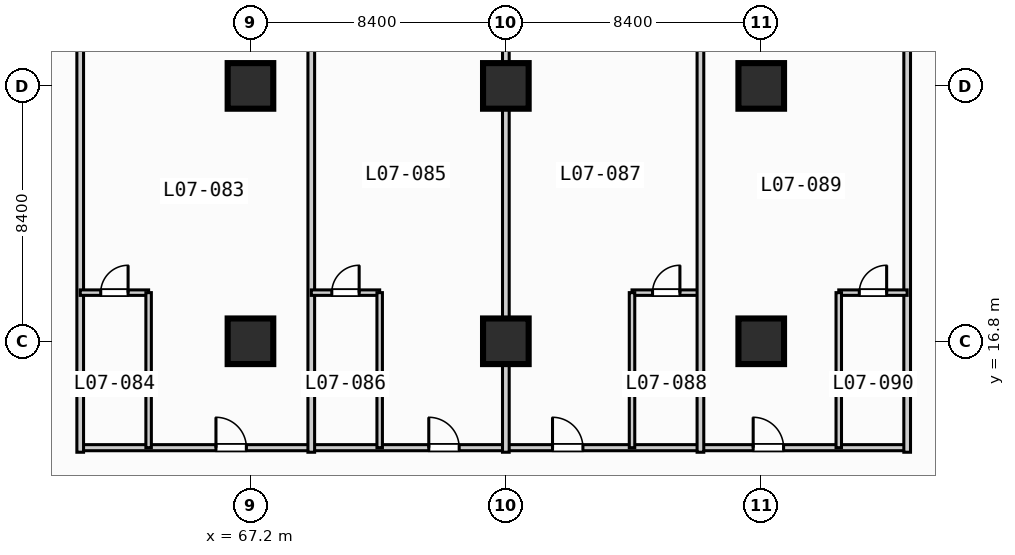
"""IFC4 building model, lengths in metres.
Left out: names, types, materials, properties, quantities, classifications, styles, units other than length and angle.
Written with IfcOpenShell. Run it as: python <this file> out.ifc"""

import sys

from ifc_helpers import new_model, si_unit, direction, frame, frame_2d, origin, origin_2d, place, context, subcontext, project, spatial, rectangle, extrude, element, fill, save


model = new_model("IFC4")
c1 = context("Model", 3, precision=1e-05, world=origin(), true_north=direction((0.0, 1.0)))
c2 = subcontext(c1, "Body", "Model", "MODEL_VIEW")
j1 = project(units=[si_unit("LENGTHUNIT", "METRE"), si_unit("PLANEANGLEUNIT", "RADIAN")], contexts=[c1])
p1 = place(None, origin())
s1 = spatial("IfcSite", under=j1, at=p1, CompositionType="ELEMENT")
p2 = place(p1, origin())
s2 = spatial("IfcBuilding", under=s1, at=p2, CompositionType="ELEMENT")
p3 = place(p2, frame((0.0, 0.0, 35.8)))
s3 = spatial("IfcBuildingStorey", under=s2, at=p3, CompositionType="ELEMENT", Elevation=35.8)
for number, where, z_axis, x_axis in (
    (1, (67.2, 16.8, 0.0), (0.0, 0.0, 1.0), (1.0, 0.0, 0.0)),
    (2, (67.2, 25.2, 0.0), (0.0, 0.0, 1.0), (1.0, 0.0, 0.0)),
    (3, (75.6, 16.8, 0.0), (0.0, 0.0, 1.0), (1.0, 0.0, 0.0)),
    (4, (75.6, 25.2, 0.0), (0.0, 0.0, 1.0), (1.0, 0.0, 0.0)),
    (5, (84.0, 16.8, 0.0), (0.0, 0.0, 1.0), (1.0, 0.0, 0.0)),
    (6, (84.0, 25.2, 0.0), (0.0, 0.0, 1.0), (1.0, 0.0, 0.0)),
):
    element("IfcColumn", number, at=place(p3, frame(where, z_axis=z_axis, x_axis=x_axis)), inside=s3, PredefinedType="COLUMN", context=c2, shape_type="SweptSolid", body=[
        extrude(rectangle(XDim=1.5, YDim=1.5, at=origin_2d()), origin(), (0.0, 0.0, 1.0), 3.8),
    ])
p4 = place(p3, frame((61.6, 13.3, 0.0), z_axis=(0.0, 0.0, 1.0), x_axis=(1.0, 0.0, 0.0)))
e7 = element("IfcWall", 7, at=p4, inside=s3, PredefinedType="PARTITIONING", context=c2, shape_type="SweptSolid", body=[
    extrude(rectangle(XDim=27.2, YDim=0.2, at=frame_2d((13.6, 0.0))), origin(), (0.0, 0.0, 1.0), 3.55),
])
p5 = place(p4, frame((4.465, 0.0, 0.0)))
e8 = element("IfcOpeningElement", 8, at=p5, cuts=e7, PredefinedType="OPENING", context=c2, shape_type="SweptSolid", body=[
    extrude(rectangle(XDim=1.0, YDim=2.15, at=frame_2d((0.5, 1.075))), frame((0.0, 0.11, 0.0), z_axis=(0.0, -1.0, 0.0), x_axis=(1.0, 0.0, 0.0)), (0.0, 0.0, 1.0), 0.22),
])
p6 = place(p4, frame((11.465, 0.0, 0.0)))
e9 = element("IfcOpeningElement", 9, at=p6, cuts=e7, PredefinedType="OPENING", context=c2, shape_type="SweptSolid", body=[
    extrude(rectangle(XDim=1.0, YDim=2.15, at=frame_2d((0.5, 1.075))), frame((0.0, 0.11, 0.0), z_axis=(0.0, -1.0, 0.0), x_axis=(1.0, 0.0, 0.0)), (0.0, 0.0, 1.0), 0.22),
])
p7 = place(p4, frame((15.535, 0.0, 0.0)))
e10 = element("IfcOpeningElement", 10, at=p7, cuts=e7, PredefinedType="OPENING", context=c2, shape_type="SweptSolid", body=[
    extrude(rectangle(XDim=1.0, YDim=2.15, at=frame_2d((0.5, 1.075))), frame((0.0, 0.11, 0.0), z_axis=(0.0, -1.0, 0.0), x_axis=(1.0, 0.0, 0.0)), (0.0, 0.0, 1.0), 0.22),
])
p8 = place(p4, frame((22.135, 0.0, 0.0)))
e11 = element("IfcOpeningElement", 11, at=p8, cuts=e7, PredefinedType="OPENING", context=c2, shape_type="SweptSolid", body=[
    extrude(rectangle(XDim=1.0, YDim=2.15, at=frame_2d((0.5, 1.075))), frame((0.0, 0.11, 0.0), z_axis=(0.0, -1.0, 0.0), x_axis=(1.0, 0.0, 0.0)), (0.0, 0.0, 1.0), 0.22),
])
p9 = place(p3, frame((61.6, 13.15, 0.0), z_axis=(0.0, 0.0, 1.0), x_axis=(0.0, 1.0, 0.0)))
e12 = element("IfcWall", 12, at=p9, inside=s3, PredefinedType="PARTITIONING", context=c2, shape_type="SweptSolid", body=[
    extrude(rectangle(XDim=20.28, YDim=0.22, at=frame_2d((10.14, 0.0))), origin(), (0.0, 0.0, 1.0), 3.55),
])
p10 = place(p3, frame((61.6, 18.4, 0.0), z_axis=(0.0, 0.0, 1.0), x_axis=(1.0, 0.0, 0.0)))
e13 = element("IfcWall", 13, at=p10, inside=s3, PredefinedType="PLUMBINGWALL", context=c2, shape_type="SweptSolid", body=[
    extrude(rectangle(XDim=2.25, YDim=0.18, at=frame_2d((1.125, 0.0))), origin(), (0.0, 0.0, 1.0), 3.55),
])
p11 = place(p10, frame((0.675, 0.0, 0.0)))
e14 = element("IfcOpeningElement", 14, at=p11, cuts=e13, PredefinedType="OPENING", context=c2, shape_type="SweptSolid", body=[
    extrude(rectangle(XDim=0.9, YDim=2.1, at=frame_2d((0.45, 1.05))), frame((0.0, 0.1, 0.0), z_axis=(0.0, -1.0, 0.0), x_axis=(1.0, 0.0, 0.0)), (0.0, 0.0, 1.0), 0.2),
])
p12 = place(p3, frame((63.85, 13.3, 0.0), z_axis=(0.0, 0.0, 1.0), x_axis=(0.0, 1.0, 0.0)))
e15 = element("IfcWall", 15, at=p12, inside=s3, PredefinedType="PLUMBINGWALL", context=c2, shape_type="SweptSolid", body=[
    extrude(rectangle(XDim=5.1, YDim=0.18, at=frame_2d((2.55, 0.0))), origin(), (0.0, 0.0, 1.0), 3.55),
])
p13 = place(p3, frame((69.2, 13.15, 0.0), z_axis=(0.0, 0.0, 1.0), x_axis=(0.0, 1.0, 0.0)))
e16 = element("IfcWall", 16, at=p13, inside=s3, PredefinedType="PARTITIONING", context=c2, shape_type="SweptSolid", body=[
    extrude(rectangle(XDim=20.28, YDim=0.22, at=frame_2d((10.14, 0.0))), origin(), (0.0, 0.0, 1.0), 3.55),
])
p14 = place(p3, frame((69.2, 18.4, 0.0), z_axis=(0.0, 0.0, 1.0), x_axis=(1.0, 0.0, 0.0)))
e17 = element("IfcWall", 17, at=p14, inside=s3, PredefinedType="PLUMBINGWALL", context=c2, shape_type="SweptSolid", body=[
    extrude(rectangle(XDim=2.25, YDim=0.18, at=frame_2d((1.125, 0.0))), origin(), (0.0, 0.0, 1.0), 3.55),
])
p15 = place(p14, frame((0.675, 0.0, 0.0)))
e18 = element("IfcOpeningElement", 18, at=p15, cuts=e17, PredefinedType="OPENING", context=c2, shape_type="SweptSolid", body=[
    extrude(rectangle(XDim=0.9, YDim=2.1, at=frame_2d((0.45, 1.05))), frame((0.0, 0.1, 0.0), z_axis=(0.0, -1.0, 0.0), x_axis=(1.0, 0.0, 0.0)), (0.0, 0.0, 1.0), 0.2),
])
p16 = place(p3, frame((71.45, 13.3, 0.0), z_axis=(0.0, 0.0, 1.0), x_axis=(0.0, 1.0, 0.0)))
e19 = element("IfcWall", 19, at=p16, inside=s3, PredefinedType="PLUMBINGWALL", context=c2, shape_type="SweptSolid", body=[
    extrude(rectangle(XDim=5.1, YDim=0.18, at=frame_2d((2.55, 0.0))), origin(), (0.0, 0.0, 1.0), 3.55),
])
p17 = place(p3, frame((75.6, 13.15, 0.0), z_axis=(0.0, 0.0, 1.0), x_axis=(0.0, 1.0, 0.0)))
e20 = element("IfcWall", 20, at=p17, inside=s3, PredefinedType="PARTITIONING", context=c2, shape_type="SweptSolid", body=[
    extrude(rectangle(XDim=20.28, YDim=0.22, at=frame_2d((10.14, 0.0))), origin(), (0.0, 0.0, 1.0), 2.8),
])
p18 = place(p3, frame((79.75, 18.4, 0.0), z_axis=(0.0, 0.0, 1.0), x_axis=(1.0, 0.0, 0.0)))
e21 = element("IfcWall", 21, at=p18, inside=s3, PredefinedType="PLUMBINGWALL", context=c2, shape_type="SweptSolid", body=[
    extrude(rectangle(XDim=2.25, YDim=0.18, at=frame_2d((1.125, 0.0))), origin(), (0.0, 0.0, 1.0), 3.55),
])
p19 = place(p18, frame((0.675, 0.0, 0.0)))
e22 = element("IfcOpeningElement", 22, at=p19, cuts=e21, PredefinedType="OPENING", context=c2, shape_type="SweptSolid", body=[
    extrude(rectangle(XDim=0.9, YDim=2.1, at=frame_2d((0.45, 1.05))), frame((0.0, 0.1, 0.0), z_axis=(0.0, -1.0, 0.0), x_axis=(1.0, 0.0, 0.0)), (0.0, 0.0, 1.0), 0.2),
])
p20 = place(p3, frame((79.75, 13.3, 0.0), z_axis=(0.0, 0.0, 1.0), x_axis=(0.0, 1.0, 0.0)))
e23 = element("IfcWall", 23, at=p20, inside=s3, PredefinedType="PLUMBINGWALL", context=c2, shape_type="SweptSolid", body=[
    extrude(rectangle(XDim=5.1, YDim=0.18, at=frame_2d((2.55, 0.0))), origin(), (0.0, 0.0, 1.0), 3.55),
])
for number, where, z_axis, x_axis in (
    (24, (82.0, 13.15, 0.0), (0.0, 0.0, 1.0), (0.0, 1.0, 0.0)),
    (25, (88.8, 13.15, 0.0), (0.0, 0.0, 1.0), (0.0, 1.0, 0.0)),
):
    element("IfcWall", number, at=place(p3, frame(where, z_axis=z_axis, x_axis=x_axis)), inside=s3, PredefinedType="PARTITIONING", context=c2, shape_type="SweptSolid", body=[
        extrude(rectangle(XDim=20.28, YDim=0.22, at=frame_2d((10.14, 0.0))), origin(), (0.0, 0.0, 1.0), 3.55),
    ])
p21 = place(p3, frame((86.55, 18.4, 0.0), z_axis=(0.0, 0.0, 1.0), x_axis=(1.0, 0.0, 0.0)))
e26 = element("IfcWall", 26, at=p21, inside=s3, PredefinedType="PLUMBINGWALL", context=c2, shape_type="SweptSolid", body=[
    extrude(rectangle(XDim=2.25, YDim=0.18, at=frame_2d((1.125, 0.0))), origin(), (0.0, 0.0, 1.0), 3.55),
])
p22 = place(p21, frame((0.675, 0.0, 0.0)))
e27 = element("IfcOpeningElement", 27, at=p22, cuts=e26, PredefinedType="OPENING", context=c2, shape_type="SweptSolid", body=[
    extrude(rectangle(XDim=0.9, YDim=2.1, at=frame_2d((0.45, 1.05))), frame((0.0, 0.1, 0.0), z_axis=(0.0, -1.0, 0.0), x_axis=(1.0, 0.0, 0.0)), (0.0, 0.0, 1.0), 0.2),
])
p23 = place(p3, frame((86.55, 13.3, 0.0), z_axis=(0.0, 0.0, 1.0), x_axis=(0.0, 1.0, 0.0)))
e28 = element("IfcWall", 28, at=p23, inside=s3, PredefinedType="PLUMBINGWALL", context=c2, shape_type="SweptSolid", body=[
    extrude(rectangle(XDim=5.1, YDim=0.18, at=frame_2d((2.55, 0.0))), origin(), (0.0, 0.0, 1.0), 3.55),
])
p24 = place(p5, origin())
e29 = element("IfcDoor", 29, at=p24, inside=s3, OperationType="SINGLE_SWING_LEFT", PredefinedType="DOOR", context=c2, shape_type="SweptSolid", body=[
    extrude(rectangle(XDim=1.0, YDim=2.15, at=frame_2d((0.5, 1.075))), frame((0.0, 0.025, 0.0), z_axis=(0.0, -1.0, 0.0), x_axis=(1.0, 0.0, 0.0)), (0.0, 0.0, 1.0), 0.05),
])
fill(e8, e29)
p25 = place(p6, origin())
e30 = element("IfcDoor", 30, at=p25, inside=s3, OperationType="SINGLE_SWING_LEFT", PredefinedType="DOOR", context=c2, shape_type="SweptSolid", body=[
    extrude(rectangle(XDim=1.0, YDim=2.15, at=frame_2d((0.5, 1.075))), frame((0.0, 0.025, 0.0), z_axis=(0.0, -1.0, 0.0), x_axis=(1.0, 0.0, 0.0)), (0.0, 0.0, 1.0), 0.05),
])
fill(e9, e30)
p26 = place(p7, origin())
e31 = element("IfcDoor", 31, at=p26, inside=s3, OperationType="SINGLE_SWING_LEFT", PredefinedType="DOOR", context=c2, shape_type="SweptSolid", body=[
    extrude(rectangle(XDim=1.0, YDim=2.15, at=frame_2d((0.5, 1.075))), frame((0.0, 0.025, 0.0), z_axis=(0.0, -1.0, 0.0), x_axis=(1.0, 0.0, 0.0)), (0.0, 0.0, 1.0), 0.05),
])
fill(e10, e31)
p27 = place(p8, origin())
e32 = element("IfcDoor", 32, at=p27, inside=s3, OperationType="SINGLE_SWING_LEFT", PredefinedType="DOOR", context=c2, shape_type="SweptSolid", body=[
    extrude(rectangle(XDim=1.0, YDim=2.15, at=frame_2d((0.5, 1.075))), frame((0.0, 0.025, 0.0), z_axis=(0.0, -1.0, 0.0), x_axis=(1.0, 0.0, 0.0)), (0.0, 0.0, 1.0), 0.05),
])
fill(e11, e32)
p28 = place(p11, origin())
e33 = element("IfcDoor", 33, at=p28, inside=s3, OperationType="SINGLE_SWING_RIGHT", PredefinedType="DOOR", context=c2, shape_type="SweptSolid", body=[
    extrude(rectangle(XDim=0.9, YDim=2.1, at=frame_2d((0.45, 1.05))), frame((0.0, 0.025, 0.0), z_axis=(0.0, -1.0, 0.0), x_axis=(1.0, 0.0, 0.0)), (0.0, 0.0, 1.0), 0.05),
])
fill(e14, e33)
p29 = place(p15, origin())
e34 = element("IfcDoor", 34, at=p29, inside=s3, OperationType="SINGLE_SWING_RIGHT", PredefinedType="DOOR", context=c2, shape_type="SweptSolid", body=[
    extrude(rectangle(XDim=0.9, YDim=2.1, at=frame_2d((0.45, 1.05))), frame((0.0, 0.025, 0.0), z_axis=(0.0, -1.0, 0.0), x_axis=(1.0, 0.0, 0.0)), (0.0, 0.0, 1.0), 0.05),
])
fill(e18, e34)
p30 = place(p19, origin())
e35 = element("IfcDoor", 35, at=p30, inside=s3, OperationType="SINGLE_SWING_RIGHT", PredefinedType="DOOR", context=c2, shape_type="SweptSolid", body=[
    extrude(rectangle(XDim=0.9, YDim=2.1, at=frame_2d((0.45, 1.05))), frame((0.0, 0.025, 0.0), z_axis=(0.0, -1.0, 0.0), x_axis=(1.0, 0.0, 0.0)), (0.0, 0.0, 1.0), 0.05),
])
fill(e22, e35)
p31 = place(p22, origin())
e36 = element("IfcDoor", 36, at=p31, inside=s3, OperationType="SINGLE_SWING_RIGHT", PredefinedType="DOOR", context=c2, shape_type="SweptSolid", body=[
    extrude(rectangle(XDim=0.9, YDim=2.1, at=frame_2d((0.45, 1.05))), frame((0.0, 0.025, 0.0), z_axis=(0.0, -1.0, 0.0), x_axis=(1.0, 0.0, 0.0)), (0.0, 0.0, 1.0), 0.05),
])
fill(e27, e36)
save(model, sys.argv[1])
